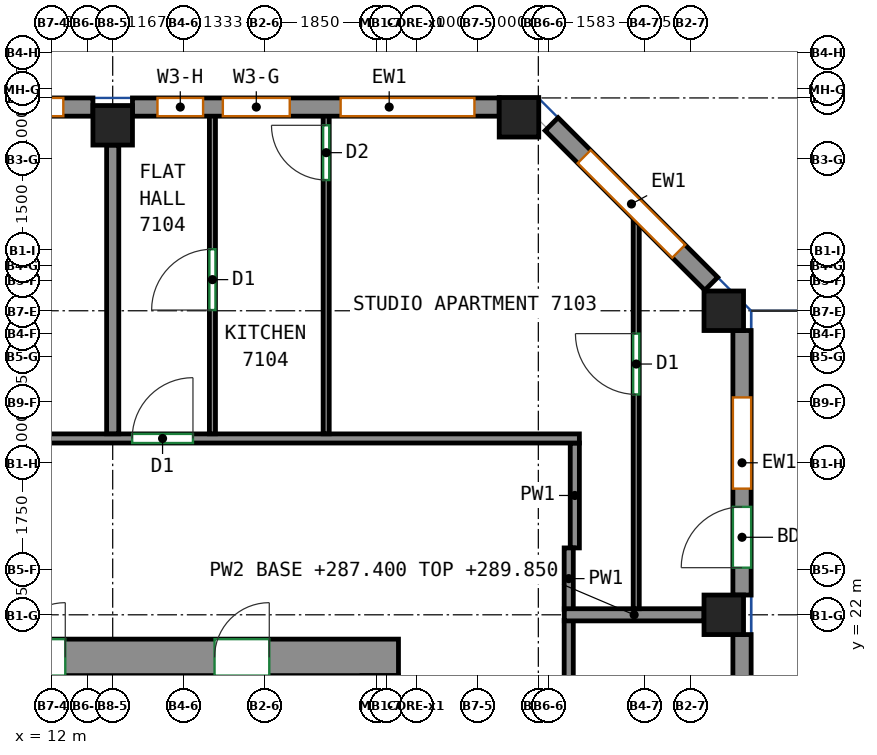
"""IFC4 building model, lengths in metres.
Left out: names, types, materials, properties, quantities, classifications, styles, units other than length and angle.
Written with IfcOpenShell. Run it as: python <this file> out.ifc"""

import sys

from ifc_helpers import new_model, si_unit, direction, frame, frame_2d, origin, origin_2d, place, context, subcontext, project, spatial, rectangle, extrude, source, transform, mapped, element, fill, save


model = new_model("IFC4")
c1 = context("Model", 3, precision=1e-05, world=origin(), true_north=direction((0.0, 1.0)))
c2 = subcontext(c1, "Body", "Model", "MODEL_VIEW")
j1 = project(units=[si_unit("LENGTHUNIT", "METRE"), si_unit("PLANEANGLEUNIT", "RADIAN")], contexts=[c1])
p1 = place(None, origin())
s1 = spatial("IfcSite", under=j1, at=p1, CompositionType="ELEMENT")
p2 = place(p1, origin())
s2 = spatial("IfcBuilding", under=s1, at=p2, CompositionType="ELEMENT")
p3 = place(p2, frame((0.0, 0.0, 287.4)))
s3 = spatial("IfcBuildingStorey", under=s2, at=p3, CompositionType="ELEMENT", Elevation=287.4)
m1 = source(origin(), c2, "Body", "SweptSolid", [
    extrude(rectangle(XDim=0.65, YDim=0.65, at=origin_2d()), origin(), (0.0, 0.0, 1.0), 3.0),
])
for number, where, z_axis, x_axis in (
    (1, (13.0, 30.05, 0.0), (0.0, 0.0, 1.0), (1.0, 0.0, 0.0)),
    (2, (19.682, 30.182, 0.0), (0.0, 0.0, 1.0), (1.0, 0.0, 0.0)),
    (3, (23.05, 22.0, 0.0), (0.0, 0.0, 1.0), (1.0, 0.0, 0.0)),
    (4, (23.05, 27.0, 0.0), (0.0, 0.0, 1.0), (1.0, 0.0, 0.0)),
):
    element("IfcColumn", number, at=place(p3, frame(where, z_axis=z_axis, x_axis=x_axis)), inside=s3, PredefinedType="COLUMN", context=c2, shape_type="MappedRepresentation", body=[
        mapped(m1, transform((0.0, 0.0, 0.0))),
    ])
m2 = source(origin(), c2, "Body", "SweptSolid", [
    extrude(rectangle(XDim=33.3, YDim=0.6, at=frame_2d((16.65, 0.0))), origin(), (0.0, 0.0, 1.0), 3.0),
])
p4 = place(p3, frame((-15.6, 21.3, 0.0), z_axis=(0.0, 0.0, 1.0), x_axis=(1.0, 0.0, 0.0)))
e5 = element("IfcWall", 5, at=p4, inside=s3, PredefinedType="SHEAR", context=c2, shape_type="MappedRepresentation", body=[
    mapped(m2, transform((0.0, 0.0, 0.0))),
])
p5 = place(p4, frame((5.708, 0.0, 0.0)))
e6 = element("IfcOpeningElement", 6, at=p5, cuts=e5, PredefinedType="OPENING", context=c2, shape_type="SweptSolid", body=[
    extrude(rectangle(XDim=0.9, YDim=2.1, at=frame_2d((0.45, 1.05))), frame((0.0, 0.31, 0.0), z_axis=(0.0, -1.0, 0.0), x_axis=(1.0, 0.0, 0.0)), (0.0, 0.0, 1.0), 0.62),
])
p6 = place(p4, frame((10.773, 0.0, 0.0)))
e7 = element("IfcOpeningElement", 7, at=p6, cuts=e5, PredefinedType="OPENING", context=c2, shape_type="SweptSolid", body=[
    extrude(rectangle(XDim=0.9, YDim=2.1, at=frame_2d((0.45, 1.05))), frame((0.0, 0.31, 0.0), z_axis=(0.0, -1.0, 0.0), x_axis=(1.0, 0.0, 0.0)), (0.0, 0.0, 1.0), 0.62),
])
p7 = place(p4, frame((15.838, 0.0, 0.0)))
e8 = element("IfcOpeningElement", 8, at=p7, cuts=e5, PredefinedType="OPENING", context=c2, shape_type="SweptSolid", body=[
    extrude(rectangle(XDim=0.9, YDim=2.1, at=frame_2d((0.45, 1.05))), frame((0.0, 0.31, 0.0), z_axis=(0.0, -1.0, 0.0), x_axis=(1.0, 0.0, 0.0)), (0.0, 0.0, 1.0), 0.62),
])
p8 = place(p4, frame((21.493, 0.0, 0.0)))
e9 = element("IfcOpeningElement", 9, at=p8, cuts=e5, PredefinedType="OPENING", context=c2, shape_type="SweptSolid", body=[
    extrude(rectangle(XDim=0.9, YDim=2.1, at=frame_2d((0.45, 1.05))), frame((0.0, 0.31, 0.0), z_axis=(0.0, -1.0, 0.0), x_axis=(1.0, 0.0, 0.0)), (0.0, 0.0, 1.0), 0.62),
])
p9 = place(p4, frame((26.92, 0.0, 0.0)))
e10 = element("IfcOpeningElement", 10, at=p9, cuts=e5, PredefinedType="OPENING", context=c2, shape_type="SweptSolid", body=[
    extrude(rectangle(XDim=0.9, YDim=2.1, at=frame_2d((0.45, 1.05))), frame((0.0, 0.31, 0.0), z_axis=(0.0, -1.0, 0.0), x_axis=(1.0, 0.0, 0.0)), (0.0, 0.0, 1.0), 0.62),
])
p10 = place(p4, frame((2.125, 0.0, 0.0)))
e11 = element("IfcOpeningElement", 11, at=p10, cuts=e5, PredefinedType="OPENING", context=c2, shape_type="SweptSolid", body=[
    extrude(rectangle(XDim=0.9, YDim=2.1, at=frame_2d((0.45, 1.05))), frame((0.0, 0.31, 0.0), z_axis=(0.0, -1.0, 0.0), x_axis=(1.0, 0.0, 0.0)), (0.0, 0.0, 1.0), 0.62),
])
p11 = place(p4, frame((30.275, 0.0, 0.0)))
e12 = element("IfcOpeningElement", 12, at=p11, cuts=e5, PredefinedType="OPENING", context=c2, shape_type="SweptSolid", body=[
    extrude(rectangle(XDim=0.9, YDim=2.1, at=frame_2d((0.45, 1.05))), frame((0.0, 0.31, 0.0), z_axis=(0.0, -1.0, 0.0), x_axis=(1.0, 0.0, 0.0)), (0.0, 0.0, 1.0), 0.62),
])
m3 = source(origin(), c2, "Body", "SweptSolid", [
    extrude(rectangle(XDim=13.35, YDim=0.3, at=frame_2d((6.675, 0.0))), origin(), (0.0, 0.0, 1.0), 3.0),
])
p12 = place(p3, frame((23.35, 8.325, 0.0), z_axis=(0.0, 0.0, 1.0), x_axis=(0.0, 1.0, 0.0)))
e13 = element("IfcWall", 13, at=p12, inside=s3, PredefinedType="SOLIDWALL", context=c2, shape_type="MappedRepresentation", body=[
    mapped(m3, transform((0.0, 0.0, 0.0))),
])
p13 = place(p12, frame((0.919, 0.0, 0.8)))
e14 = element("IfcOpeningElement", 14, at=p13, cuts=e13, PredefinedType="OPENING", context=c2, shape_type="SweptSolid", body=[
    extrude(rectangle(XDim=1.5, YDim=2.05, at=frame_2d((0.75, 1.025))), frame((0.0, 0.16, 0.0), z_axis=(0.0, -1.0, 0.0), x_axis=(1.0, 0.0, 0.0)), (0.0, 0.0, 1.0), 0.32),
])
p14 = place(p12, frame((4.256, 0.0, 0.8)))
e15 = element("IfcOpeningElement", 15, at=p14, cuts=e13, PredefinedType="OPENING", context=c2, shape_type="SweptSolid", body=[
    extrude(rectangle(XDim=1.5, YDim=2.05, at=frame_2d((0.75, 1.025))), frame((0.0, 0.16, 0.0), z_axis=(0.0, -1.0, 0.0), x_axis=(1.0, 0.0, 0.0)), (0.0, 0.0, 1.0), 0.32),
])
p15 = place(p12, frame((7.594, 0.0, 0.8)))
e16 = element("IfcOpeningElement", 16, at=p15, cuts=e13, PredefinedType="OPENING", context=c2, shape_type="SweptSolid", body=[
    extrude(rectangle(XDim=1.5, YDim=2.05, at=frame_2d((0.75, 1.025))), frame((0.0, 0.16, 0.0), z_axis=(0.0, -1.0, 0.0), x_axis=(1.0, 0.0, 0.0)), (0.0, 0.0, 1.0), 0.32),
])
p16 = place(p12, frame((10.931, 0.0, 0.8)))
e17 = element("IfcOpeningElement", 17, at=p16, cuts=e13, PredefinedType="OPENING", context=c2, shape_type="SweptSolid", body=[
    extrude(rectangle(XDim=1.5, YDim=2.05, at=frame_2d((0.75, 1.025))), frame((0.0, 0.16, 0.0), z_axis=(0.0, -1.0, 0.0), x_axis=(1.0, 0.0, 0.0)), (0.0, 0.0, 1.0), 0.32),
])
m4 = source(origin(), c2, "Body", "SweptSolid", [
    extrude(rectangle(XDim=4.35, YDim=0.3, at=frame_2d((2.175, 0.0))), origin(), (0.0, 0.0, 1.0), 3.0),
])
p17 = place(p3, frame((23.35, 22.325, 0.0), z_axis=(0.0, 0.0, 1.0), x_axis=(0.0, 1.0, 0.0)))
e18 = element("IfcWall", 18, at=p17, inside=s3, PredefinedType="SOLIDWALL", context=c2, shape_type="MappedRepresentation", body=[
    mapped(m4, transform((0.0, 0.0, 0.0))),
])
p18 = place(p17, frame((1.75, 0.0, 0.8)))
e19 = element("IfcOpeningElement", 19, at=p18, cuts=e18, PredefinedType="OPENING", context=c2, shape_type="SweptSolid", body=[
    extrude(rectangle(XDim=1.5, YDim=2.05, at=frame_2d((0.75, 1.025))), frame((0.0, 0.16, 0.0), z_axis=(0.0, -1.0, 0.0), x_axis=(1.0, 0.0, 0.0)), (0.0, 0.0, 1.0), 0.32),
])
p19 = place(p17, frame((0.45, 0.0, 0.0)))
e20 = element("IfcOpeningElement", 20, at=p19, cuts=e18, PredefinedType="OPENING", context=c2, shape_type="SweptSolid", body=[
    extrude(rectangle(XDim=1.0, YDim=2.1, at=frame_2d((0.5, 1.05))), frame((0.0, 0.16, 0.0), z_axis=(0.0, -1.0, 0.0), x_axis=(1.0, 0.0, 0.0)), (0.0, 0.0, 1.0), 0.32),
])
m5 = source(origin(), c2, "Body", "SweptSolid", [
    extrude(rectangle(XDim=3.712, YDim=0.3, at=frame_2d((1.856, 0.0))), origin(), (0.0, 0.0, 1.0), 3.0),
])
p20 = place(p3, frame((22.844, 27.444, 0.0), z_axis=(0.0, 0.0, 1.0), x_axis=(-0.707106781187, 0.707106781187, 0.0)))
e21 = element("IfcWall", 21, at=p20, inside=s3, PredefinedType="SOLIDWALL", context=c2, shape_type="MappedRepresentation", body=[
    mapped(m5, transform((0.0, 0.0, 0.0))),
])
p21 = place(p20, frame((0.756, 0.0, 0.8)))
e22 = element("IfcOpeningElement", 22, at=p21, cuts=e21, PredefinedType="OPENING", context=c2, shape_type="SweptSolid", body=[
    extrude(rectangle(XDim=2.2, YDim=2.05, at=frame_2d((1.1, 1.025))), frame((0.0, 0.16, 0.0), z_axis=(0.0, -1.0, 0.0), x_axis=(1.0, 0.0, 0.0)), (0.0, 0.0, 1.0), 0.32),
])
m6 = source(origin(), c2, "Body", "SweptSolid", [
    extrude(rectangle(XDim=6.032, YDim=0.3, at=frame_2d((3.016, 0.0))), origin(), (0.0, 0.0, 1.0), 3.0),
])
p22 = place(p3, frame((19.357, 30.35, 0.0), z_axis=(0.0, 0.0, 1.0), x_axis=(-1.0, 0.0, 0.0)))
e23 = element("IfcWall", 23, at=p22, inside=s3, PredefinedType="SOLIDWALL", context=c2, shape_type="MappedRepresentation", body=[
    mapped(m6, transform((0.0, 0.0, 0.0))),
])
p23 = place(p22, frame((0.408, 0.0, 0.8)))
e24 = element("IfcOpeningElement", 24, at=p23, cuts=e23, PredefinedType="OPENING", context=c2, shape_type="SweptSolid", body=[
    extrude(rectangle(XDim=2.2, YDim=2.05, at=frame_2d((1.1, 1.025))), frame((0.0, 0.16, 0.0), z_axis=(0.0, -1.0, 0.0), x_axis=(1.0, 0.0, 0.0)), (0.0, 0.0, 1.0), 0.32),
])
p24 = place(p22, frame((3.445, 0.0, 0.8)))
e25 = element("IfcOpeningElement", 25, at=p24, cuts=e23, PredefinedType="OPENING", context=c2, shape_type="SweptSolid", body=[
    extrude(rectangle(XDim=1.1, YDim=2.05, at=frame_2d((0.55, 1.025))), frame((0.0, 0.16, 0.0), z_axis=(0.0, -1.0, 0.0), x_axis=(1.0, 0.0, 0.0)), (0.0, 0.0, 1.0), 0.32),
])
p25 = place(p22, frame((4.87, 0.0, 0.8)))
e26 = element("IfcOpeningElement", 26, at=p25, cuts=e23, PredefinedType="OPENING", context=c2, shape_type="SweptSolid", body=[
    extrude(rectangle(XDim=0.75, YDim=2.05, at=frame_2d((0.375, 1.025))), frame((0.0, 0.16, 0.0), z_axis=(0.0, -1.0, 0.0), x_axis=(1.0, 0.0, 0.0)), (0.0, 0.0, 1.0), 0.32),
])
m7 = source(origin(), c2, "Body", "SweptSolid", [
    extrude(rectangle(XDim=6.35, YDim=0.3, at=frame_2d((3.175, 0.0))), origin(), (0.0, 0.0, 1.0), 3.0),
])
p26 = place(p3, frame((12.675, 30.35, 0.0), z_axis=(0.0, 0.0, 1.0), x_axis=(-1.0, 0.0, 0.0)))
e27 = element("IfcWall", 27, at=p26, inside=s3, PredefinedType="SOLIDWALL", context=c2, shape_type="MappedRepresentation", body=[
    mapped(m7, transform((0.0, 0.0, 0.0))),
])
p27 = place(p26, frame((0.488, 0.0, 0.8)))
e28 = element("IfcOpeningElement", 28, at=p27, cuts=e27, PredefinedType="OPENING", context=c2, shape_type="SweptSolid", body=[
    extrude(rectangle(XDim=2.2, YDim=2.05, at=frame_2d((1.1, 1.025))), frame((0.0, 0.16, 0.0), z_axis=(0.0, -1.0, 0.0), x_axis=(1.0, 0.0, 0.0)), (0.0, 0.0, 1.0), 0.32),
])
p28 = place(p26, frame((3.663, 0.0, 0.8)))
e29 = element("IfcOpeningElement", 29, at=p28, cuts=e27, PredefinedType="OPENING", context=c2, shape_type="SweptSolid", body=[
    extrude(rectangle(XDim=2.2, YDim=2.05, at=frame_2d((1.1, 1.025))), frame((0.0, 0.16, 0.0), z_axis=(0.0, -1.0, 0.0), x_axis=(1.0, 0.0, 0.0)), (0.0, 0.0, 1.0), 0.32),
])
p29 = place(p3, frame((20.5, 3.875, 0.0), z_axis=(0.0, 0.0, 1.0), x_axis=(0.0, 1.0, 0.0)))
e30 = element("IfcWall", 30, at=p29, inside=s3, PredefinedType="PARTITIONING", context=c2, shape_type="SweptSolid", body=[
    extrude(rectangle(XDim=18.035, YDim=0.15, at=frame_2d((9.018, 0.0))), origin(), (0.0, 0.0, 1.0), 3.0),
])
p30 = place(p29, frame((15.532, 0.0, 0.0)))
e31 = element("IfcOpeningElement", 31, at=p30, cuts=e30, PredefinedType="OPENING", context=c2, shape_type="SweptSolid", body=[
    extrude(rectangle(XDim=0.9, YDim=2.1, at=frame_2d((0.45, 1.05))), frame((0.0, 0.085, 0.0), z_axis=(0.0, -1.0, 0.0), x_axis=(1.0, 0.0, 0.0)), (0.0, 0.0, 1.0), 0.17),
])
p31 = place(p3, frame((20.6, 23.1, 0.0), z_axis=(0.0, 0.0, 1.0), x_axis=(0.0, 1.0, 0.0)))
e32 = element("IfcWall", 32, at=p31, inside=s3, PredefinedType="PARTITIONING", context=c2, shape_type="SweptSolid", body=[
    extrude(rectangle(XDim=1.725, YDim=0.15, at=frame_2d((0.862, 0.0))), origin(), (0.0, 0.0, 1.0), 3.0),
])
p32 = place(p3, frame((20.5, 22.09, 0.0), z_axis=(0.0, 0.0, 1.0), x_axis=(0.0, 1.0, 0.0)))
e33 = element("IfcWall", 33, at=p32, inside=s3, PredefinedType="PARTITIONING", context=c2, shape_type="SweptSolid", body=[
    extrude(rectangle(XDim=1.01, YDim=0.15, at=frame_2d((0.505, 0.0))), origin(), (0.0, 0.0, 1.0), 3.0),
])
p33 = place(p3, frame((-19.075, 24.9, 0.0), z_axis=(0.0, 0.0, 1.0), x_axis=(1.0, 0.0, 0.0)))
e34 = element("IfcWall", 34, at=p33, inside=s3, PredefinedType="PARTITIONING", context=c2, shape_type="SweptSolid", body=[
    extrude(rectangle(XDim=39.75, YDim=0.15, at=frame_2d((19.875, 0.0))), origin(), (0.0, 0.0, 1.0), 3.0),
])
p34 = place(p33, frame((10.77, 0.0, 0.0)))
e35 = element("IfcOpeningElement", 35, at=p34, cuts=e34, PredefinedType="OPENING", context=c2, shape_type="SweptSolid", body=[
    extrude(rectangle(XDim=0.9, YDim=2.1, at=frame_2d((0.45, 1.05))), frame((0.0, 0.085, 0.0), z_axis=(0.0, -1.0, 0.0), x_axis=(1.0, 0.0, 0.0)), (0.0, 0.0, 1.0), 0.17),
])
p35 = place(p33, frame((32.395, 0.0, 0.0)))
e36 = element("IfcOpeningElement", 36, at=p35, cuts=e34, PredefinedType="OPENING", context=c2, shape_type="SweptSolid", body=[
    extrude(rectangle(XDim=1.0, YDim=2.1, at=frame_2d((0.5, 1.05))), frame((0.0, 0.085, 0.0), z_axis=(0.0, -1.0, 0.0), x_axis=(1.0, 0.0, 0.0)), (0.0, 0.0, 1.0), 0.17),
])
p36 = place(p3, frame((20.427, 22.0, 0.0), z_axis=(0.0, 0.0, 1.0), x_axis=(1.0, 0.0, 0.0)))
e37 = element("IfcWall", 37, at=p36, inside=s3, PredefinedType="PARTITIONING", context=c2, shape_type="SweptSolid", body=[
    extrude(rectangle(XDim=2.298, YDim=0.2, at=frame_2d((1.149, 0.0))), origin(), (0.0, 0.0, 1.0), 2.45),
])
p37 = place(p3, frame((14.64, 24.977, 0.0), z_axis=(0.0, 0.0, 1.0), x_axis=(0.0, 1.0, 0.0)))
e38 = element("IfcWall", 38, at=p37, inside=s3, PredefinedType="PARTITIONING", context=c2, shape_type="SweptSolid", body=[
    extrude(rectangle(XDim=5.273, YDim=0.1, at=frame_2d((2.636, 0.0))), origin(), (0.0, 0.0, 1.0), 3.0),
])
p38 = place(p37, frame((2.035, 0.0, 0.0)))
e39 = element("IfcOpeningElement", 39, at=p38, cuts=e38, PredefinedType="OPENING", context=c2, shape_type="SweptSolid", body=[
    extrude(rectangle(XDim=1.0, YDim=2.1, at=frame_2d((0.5, 1.05))), frame((0.0, 0.06, 0.0), z_axis=(0.0, -1.0, 0.0), x_axis=(1.0, 0.0, 0.0)), (0.0, 0.0, 1.0), 0.12),
])
p39 = place(p3, frame((13.0, 24.977, 0.0), z_axis=(0.0, 0.0, 1.0), x_axis=(0.0, 1.0, 0.0)))
e40 = element("IfcWall", 40, at=p39, inside=s3, PredefinedType="PARTITIONING", context=c2, shape_type="SweptSolid", body=[
    extrude(rectangle(XDim=4.748, YDim=0.2, at=frame_2d((2.374, 0.0))), origin(), (0.0, 0.0, 1.0), 3.0),
])
p40 = place(p3, frame((16.511, 24.977, 0.0), z_axis=(0.0, 0.0, 1.0), x_axis=(0.0, 1.0, 0.0)))
e41 = element("IfcWall", 41, at=p40, inside=s3, PredefinedType="PARTITIONING", context=c2, shape_type="SweptSolid", body=[
    extrude(rectangle(XDim=5.273, YDim=0.1, at=frame_2d((2.636, 0.0))), origin(), (0.0, 0.0, 1.0), 3.0),
])
p41 = place(p40, frame((4.173, 0.0, 0.0)))
e42 = element("IfcOpeningElement", 42, at=p41, cuts=e41, PredefinedType="OPENING", context=c2, shape_type="SweptSolid", body=[
    extrude(rectangle(XDim=0.9, YDim=2.1, at=frame_2d((0.45, 1.05))), frame((0.0, 0.06, 0.0), z_axis=(0.0, -1.0, 0.0), x_axis=(1.0, 0.0, 0.0)), (0.0, 0.0, 1.0), 0.12),
])
p42 = place(p3, frame((21.61, 22.1, 0.0), z_axis=(0.0, 0.0, 1.0), x_axis=(0.0, 1.0, 0.0)))
e43 = element("IfcWall", 43, at=p42, inside=s3, PredefinedType="PARTITIONING", context=c2, shape_type="SweptSolid", body=[
    extrude(rectangle(XDim=6.436, YDim=0.1, at=frame_2d((3.218, 0.0))), origin(), (0.0, 0.0, 1.0), 3.0),
])
p43 = place(p42, frame((3.524, 0.0, 0.0)))
e44 = element("IfcOpeningElement", 44, at=p43, cuts=e43, PredefinedType="OPENING", context=c2, shape_type="SweptSolid", body=[
    extrude(rectangle(XDim=1.0, YDim=2.1, at=frame_2d((0.5, 1.05))), frame((0.0, 0.06, 0.0), z_axis=(0.0, -1.0, 0.0), x_axis=(1.0, 0.0, 0.0)), (0.0, 0.0, 1.0), 0.12),
])
p44 = place(p18, origin())
e45 = element("IfcWindow", 45, at=p44, inside=s3, PartitioningType="SINGLE_PANEL", PredefinedType="WINDOW", context=c2, shape_type="SweptSolid", body=[
    extrude(rectangle(XDim=1.5, YDim=2.05, at=frame_2d((0.75, 1.025))), frame((0.0, 0.03, 0.0), z_axis=(0.0, -1.0, 0.0), x_axis=(1.0, 0.0, 0.0)), (0.0, 0.0, 1.0), 0.06),
])
fill(e19, e45)
p45 = place(p19, origin())
e46 = element("IfcDoor", 46, at=p45, inside=s3, OperationType="SINGLE_SWING_LEFT", PredefinedType="DOOR", context=c2, shape_type="SweptSolid", body=[
    extrude(rectangle(XDim=1.0, YDim=2.1, at=frame_2d((0.5, 1.05))), frame((0.0, 0.025, 0.0), z_axis=(0.0, -1.0, 0.0), x_axis=(1.0, 0.0, 0.0)), (0.0, 0.0, 1.0), 0.05),
])
fill(e20, e46)
p46 = place(p21, origin())
e47 = element("IfcWindow", 47, at=p46, inside=s3, PartitioningType="SINGLE_PANEL", PredefinedType="WINDOW", context=c2, shape_type="SweptSolid", body=[
    extrude(rectangle(XDim=2.2, YDim=2.05, at=frame_2d((1.1, 1.025))), frame((0.0, 0.03, 0.0), z_axis=(0.0, -1.0, 0.0), x_axis=(1.0, 0.0, 0.0)), (0.0, 0.0, 1.0), 0.06),
])
fill(e22, e47)
p47 = place(p23, origin())
e48 = element("IfcWindow", 48, at=p47, inside=s3, PartitioningType="SINGLE_PANEL", PredefinedType="WINDOW", context=c2, shape_type="SweptSolid", body=[
    extrude(rectangle(XDim=2.2, YDim=2.05, at=frame_2d((1.1, 1.025))), frame((0.0, 0.03, 0.0), z_axis=(0.0, -1.0, 0.0), x_axis=(1.0, 0.0, 0.0)), (0.0, 0.0, 1.0), 0.06),
])
fill(e24, e48)
p48 = place(p24, origin())
e49 = element("IfcWindow", 49, at=p48, inside=s3, PartitioningType="SINGLE_PANEL", PredefinedType="WINDOW", context=c2, shape_type="SweptSolid", body=[
    extrude(rectangle(XDim=1.1, YDim=2.05, at=frame_2d((0.55, 1.025))), frame((0.0, 0.03, 0.0), z_axis=(0.0, -1.0, 0.0), x_axis=(1.0, 0.0, 0.0)), (0.0, 0.0, 1.0), 0.06),
])
fill(e25, e49)
p49 = place(p27, origin())
e50 = element("IfcWindow", 50, at=p49, inside=s3, PartitioningType="SINGLE_PANEL", PredefinedType="WINDOW", context=c2, shape_type="SweptSolid", body=[
    extrude(rectangle(XDim=2.2, YDim=2.05, at=frame_2d((1.1, 1.025))), frame((0.0, 0.03, 0.0), z_axis=(0.0, -1.0, 0.0), x_axis=(1.0, 0.0, 0.0)), (0.0, 0.0, 1.0), 0.06),
])
fill(e28, e50)
p50 = place(p9, origin())
e51 = element("IfcDoor", 51, at=p50, inside=s3, OperationType="SINGLE_SWING_RIGHT", PredefinedType="DOOR", context=c2, shape_type="SweptSolid", body=[
    extrude(rectangle(XDim=0.9, YDim=2.1, at=frame_2d((0.45, 1.05))), frame((0.0, -0.155, 0.0), z_axis=(0.0, -1.0, 0.0), x_axis=(1.0, 0.0, 0.0)), (0.0, 0.0, 1.0), 0.05),
])
fill(e10, e51)
p51 = place(p11, origin())
e52 = element("IfcDoor", 52, at=p51, inside=s3, OperationType="SINGLE_SWING_RIGHT", PredefinedType="DOOR", context=c2, shape_type="SweptSolid", body=[
    extrude(rectangle(XDim=0.9, YDim=2.1, at=frame_2d((0.45, 1.05))), frame((0.0, -0.155, 0.0), z_axis=(0.0, -1.0, 0.0), x_axis=(1.0, 0.0, 0.0)), (0.0, 0.0, 1.0), 0.05),
])
fill(e12, e52)
p52 = place(p35, origin())
e53 = element("IfcDoor", 53, at=p52, inside=s3, OperationType="SINGLE_SWING_RIGHT", PredefinedType="DOOR", context=c2, shape_type="SweptSolid", body=[
    extrude(rectangle(XDim=1.0, YDim=2.1, at=frame_2d((0.5, 1.05))), frame((0.0, 0.025, 0.0), z_axis=(0.0, -1.0, 0.0), x_axis=(1.0, 0.0, 0.0)), (0.0, 0.0, 1.0), 0.05),
])
fill(e36, e53)
p53 = place(p43, origin())
e54 = element("IfcDoor", 54, at=p53, inside=s3, OperationType="SINGLE_SWING_RIGHT", PredefinedType="DOOR", context=c2, shape_type="SweptSolid", body=[
    extrude(rectangle(XDim=1.0, YDim=2.1, at=frame_2d((0.5, 1.05))), frame((0.0, 0.025, 0.0), z_axis=(0.0, -1.0, 0.0), x_axis=(1.0, 0.0, 0.0)), (0.0, 0.0, 1.0), 0.05),
])
fill(e44, e54)
p54 = place(p38, origin())
e55 = element("IfcDoor", 55, at=p54, inside=s3, OperationType="SINGLE_SWING_LEFT", PredefinedType="DOOR", context=c2, shape_type="SweptSolid", body=[
    extrude(rectangle(XDim=1.0, YDim=2.1, at=frame_2d((0.5, 1.05))), frame((0.0, 0.025, 0.0), z_axis=(0.0, -1.0, 0.0), x_axis=(1.0, 0.0, 0.0)), (0.0, 0.0, 1.0), 0.05),
])
fill(e39, e55)
p55 = place(p41, origin())
e56 = element("IfcDoor", 56, at=p55, inside=s3, OperationType="SINGLE_SWING_RIGHT", PredefinedType="DOOR", context=c2, shape_type="SweptSolid", body=[
    extrude(rectangle(XDim=0.9, YDim=2.1, at=frame_2d((0.45, 1.05))), frame((0.0, 0.025, 0.0), z_axis=(0.0, -1.0, 0.0), x_axis=(1.0, 0.0, 0.0)), (0.0, 0.0, 1.0), 0.05),
])
fill(e42, e56)
p56 = place(p25, origin())
e57 = element("IfcWindow", 57, at=p56, inside=s3, PartitioningType="SINGLE_PANEL", PredefinedType="WINDOW", context=c2, shape_type="SweptSolid", body=[
    extrude(rectangle(XDim=0.75, YDim=2.05, at=frame_2d((0.375, 1.025))), frame((0.0, 0.03, 0.0), z_axis=(0.0, -1.0, 0.0), x_axis=(1.0, 0.0, 0.0)), (0.0, 0.0, 1.0), 0.06),
])
fill(e26, e57)
save(model, sys.argv[1])
